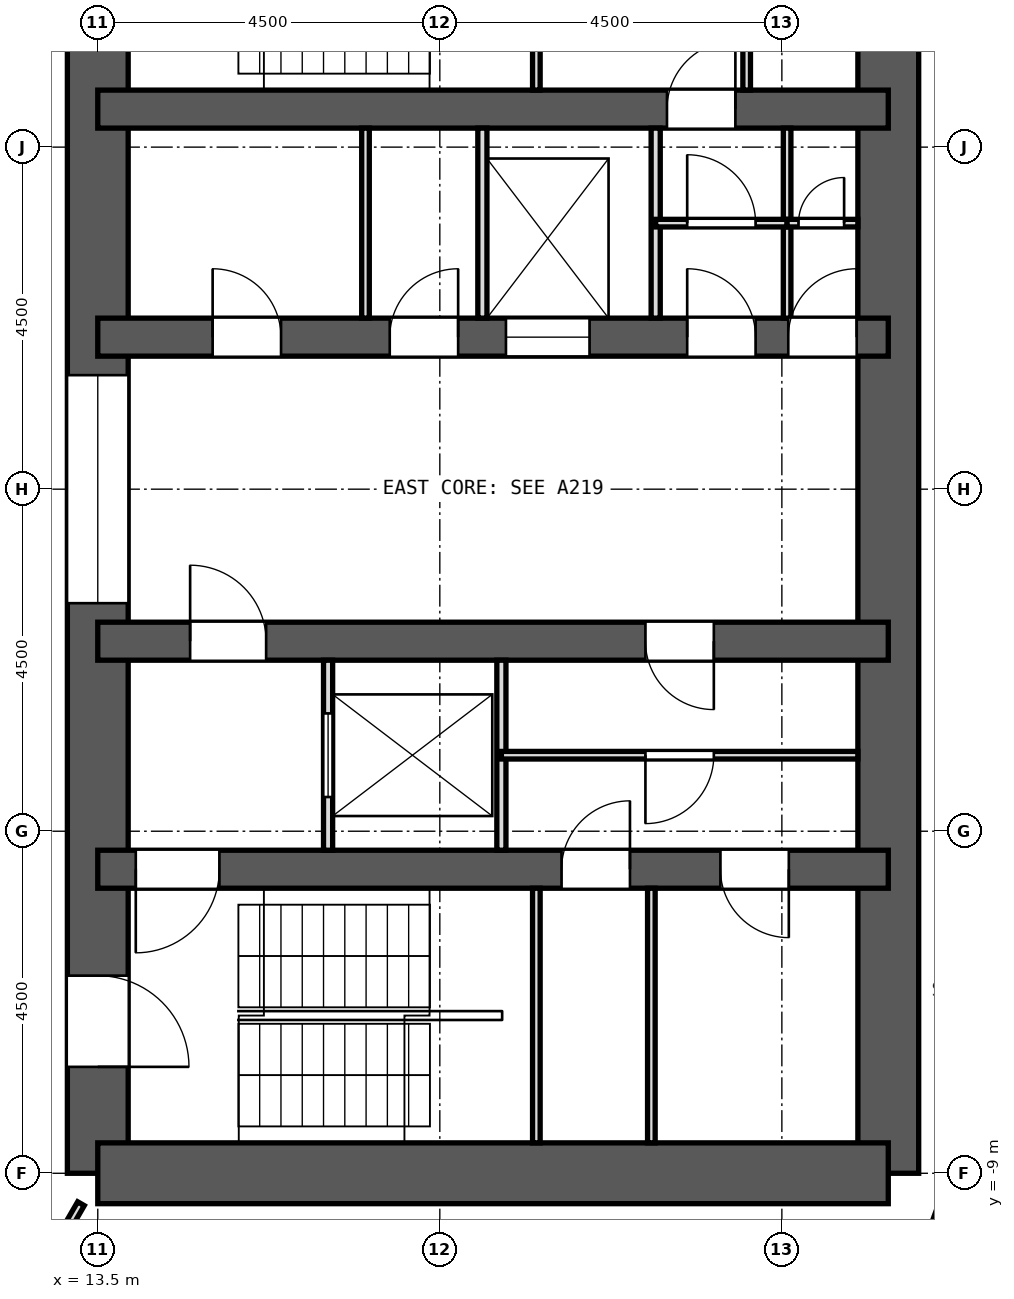
"""IFC4 building model, lengths in metres.
Left out: names, types, materials, properties, quantities, classifications, styles, units other than length and angle.
Written with IfcOpenShell. Run it as: python <this file> out.ifc"""

import sys

from ifc_helpers import new_model, si_unit, direction, frame, frame_2d, origin, place, context, subcontext, project, spatial, rectangle, extrude, element, fill, save


model = new_model("IFC4")
c1 = context("Model", 3, precision=1e-05, world=origin(), true_north=direction((0.0, 1.0)))
c2 = subcontext(c1, "Body", "Model", "MODEL_VIEW")
j1 = project(units=[si_unit("LENGTHUNIT", "METRE"), si_unit("PLANEANGLEUNIT", "RADIAN")], contexts=[c1])
p1 = place(None, origin())
s1 = spatial("IfcSite", under=j1, at=p1, CompositionType="ELEMENT")
p2 = place(p1, origin())
s2 = spatial("IfcBuilding", under=s1, at=p2, CompositionType="ELEMENT")
p3 = place(p2, frame((0.0, 0.0, 111.7)))
s3 = spatial("IfcBuildingStorey", under=s2, at=p3, CompositionType="ELEMENT", Elevation=111.7)
p4 = place(p3, frame((13.5, -9.0, 0.0), z_axis=(0.0, 0.0, 1.0), x_axis=(0.0, 1.0, 0.0)))
e1 = element("IfcWall", 1, at=p4, inside=s3, PredefinedType="SHEAR", context=c2, shape_type="SweptSolid", body=[
    extrude(rectangle(XDim=18.0, YDim=0.8, at=frame_2d((9.0, 0.0))), origin(), (0.0, 0.0, 1.0), 3.3),
])
p5 = place(p4, frame((15.4, 0.0, 0.0)))
e2 = element("IfcOpeningElement", 2, at=p5, cuts=e1, PredefinedType="OPENING", context=c2, shape_type="SweptSolid", body=[
    extrude(rectangle(XDim=1.2, YDim=2.1, at=frame_2d((0.6, 1.05))), frame((0.0, 0.412, 0.0), z_axis=(0.0, -1.0, 0.0), x_axis=(1.0, 0.0, 0.0)), (0.0, 0.0, 1.0), 0.824),
])
p6 = place(p4, frame((1.4, 0.0, 0.0)))
e3 = element("IfcOpeningElement", 3, at=p6, cuts=e1, PredefinedType="OPENING", context=c2, shape_type="SweptSolid", body=[
    extrude(rectangle(XDim=1.2, YDim=2.1, at=frame_2d((0.6, 1.05))), frame((0.0, 0.412, 0.0), z_axis=(0.0, -1.0, 0.0), x_axis=(1.0, 0.0, 0.0)), (0.0, 0.0, 1.0), 0.824),
])
p7 = place(p4, frame((7.5, 0.0, 0.0)))
e4 = element("IfcOpeningElement", 4, at=p7, cuts=e1, PredefinedType="OPENING", context=c2, shape_type="SweptSolid", body=[
    extrude(rectangle(XDim=3.0, YDim=2.4, at=frame_2d((1.5, 1.2))), frame((0.0, 0.412, 0.0), z_axis=(0.0, -1.0, 0.0), x_axis=(1.0, 0.0, 0.0)), (0.0, 0.0, 1.0), 0.824),
])
p8 = place(p3, frame((23.9, -9.0, 0.0), z_axis=(0.0, 0.0, 1.0), x_axis=(0.0, 1.0, 0.0)))
e5 = element("IfcWall", 5, at=p8, inside=s3, PredefinedType="SHEAR", context=c2, shape_type="SweptSolid", body=[
    extrude(rectangle(XDim=18.0, YDim=0.8, at=frame_2d((9.0, 0.0))), origin(), (0.0, 0.0, 1.0), 3.3),
])
p9 = place(p3, frame((13.5, -9.0, 0.0), z_axis=(0.0, 0.0, 1.0), x_axis=(1.0, 0.0, 0.0)))
e6 = element("IfcWall", 6, at=p9, inside=s3, PredefinedType="SHEAR", context=c2, shape_type="SweptSolid", body=[
    extrude(rectangle(XDim=10.4, YDim=0.8, at=frame_2d((5.2, 0.0))), origin(), (0.0, 0.0, 1.0), 3.3),
])
p10 = place(p3, frame((13.5, 5.0, 0.0), z_axis=(0.0, 0.0, 1.0), x_axis=(1.0, 0.0, 0.0)))
e7 = element("IfcWall", 7, at=p10, inside=s3, PredefinedType="SHEAR", context=c2, shape_type="SweptSolid", body=[
    extrude(rectangle(XDim=10.4, YDim=0.5, at=frame_2d((5.2, 0.0))), origin(), (0.0, 0.0, 1.0), 3.3),
])
p11 = place(p10, frame((7.489, 0.0, 0.0)))
e8 = element("IfcOpeningElement", 8, at=p11, cuts=e7, PredefinedType="OPENING", context=c2, shape_type="SweptSolid", body=[
    extrude(rectangle(XDim=0.9, YDim=2.1, at=frame_2d((0.45, 1.05))), frame((0.0, 0.262, 0.0), z_axis=(0.0, -1.0, 0.0), x_axis=(1.0, 0.0, 0.0)), (0.0, 0.0, 1.0), 0.524),
])
p12 = place(p3, frame((13.5, -5.0, 0.0), z_axis=(0.0, 0.0, 1.0), x_axis=(1.0, 0.0, 0.0)))
e9 = element("IfcWall", 9, at=p12, inside=s3, PredefinedType="SHEAR", context=c2, shape_type="SweptSolid", body=[
    extrude(rectangle(XDim=10.4, YDim=0.5, at=frame_2d((5.2, 0.0))), origin(), (0.0, 0.0, 1.0), 3.3),
])
p13 = place(p12, frame((6.102, 0.0, 0.0)))
e10 = element("IfcOpeningElement", 10, at=p13, cuts=e9, PredefinedType="OPENING", context=c2, shape_type="SweptSolid", body=[
    extrude(rectangle(XDim=0.9, YDim=2.1, at=frame_2d((0.45, 1.05))), frame((0.0, 0.262, 0.0), z_axis=(0.0, -1.0, 0.0), x_axis=(1.0, 0.0, 0.0)), (0.0, 0.0, 1.0), 0.524),
])
p14 = place(p12, frame((8.191, 0.0, 0.0)))
e11 = element("IfcOpeningElement", 11, at=p14, cuts=e9, PredefinedType="OPENING", context=c2, shape_type="SweptSolid", body=[
    extrude(rectangle(XDim=0.9, YDim=2.1, at=frame_2d((0.45, 1.05))), frame((0.0, 0.262, 0.0), z_axis=(0.0, -1.0, 0.0), x_axis=(1.0, 0.0, 0.0)), (0.0, 0.0, 1.0), 0.524),
])
p15 = place(p12, frame((0.5, 0.0, 0.0)))
e12 = element("IfcOpeningElement", 12, at=p15, cuts=e9, PredefinedType="OPENING", context=c2, shape_type="SweptSolid", body=[
    extrude(rectangle(XDim=1.1, YDim=2.1, at=frame_2d((0.55, 1.05))), frame((0.0, 0.262, 0.0), z_axis=(0.0, -1.0, 0.0), x_axis=(1.0, 0.0, 0.0)), (0.0, 0.0, 1.0), 0.524),
])
p16 = place(p3, frame((13.5, 2.0, 0.0), z_axis=(0.0, 0.0, 1.0), x_axis=(1.0, 0.0, 0.0)))
e13 = element("IfcWall", 13, at=p16, inside=s3, PredefinedType="SHEAR", context=c2, shape_type="SweptSolid", body=[
    extrude(rectangle(XDim=10.4, YDim=0.5, at=frame_2d((5.2, 0.0))), origin(), (0.0, 0.0, 1.0), 3.3),
])
p17 = place(p16, frame((5.37, 0.0, 0.0)))
e14 = element("IfcOpeningElement", 14, at=p17, cuts=e13, PredefinedType="OPENING", context=c2, shape_type="SweptSolid", body=[
    extrude(rectangle(XDim=1.1, YDim=2.1, at=frame_2d((0.55, 1.05))), frame((0.0, 0.262, 0.0), z_axis=(0.0, -1.0, 0.0), x_axis=(1.0, 0.0, 0.0)), (0.0, 0.0, 1.0), 0.524),
])
p18 = place(p16, frame((1.511, 0.0, 0.0)))
e15 = element("IfcOpeningElement", 15, at=p18, cuts=e13, PredefinedType="OPENING", context=c2, shape_type="SweptSolid", body=[
    extrude(rectangle(XDim=0.9, YDim=2.1, at=frame_2d((0.45, 1.05))), frame((0.0, 0.262, 0.0), z_axis=(0.0, -1.0, 0.0), x_axis=(1.0, 0.0, 0.0)), (0.0, 0.0, 1.0), 0.524),
])
p19 = place(p16, frame((3.841, 0.0, 0.0)))
e16 = element("IfcOpeningElement", 16, at=p19, cuts=e13, PredefinedType="OPENING", context=c2, shape_type="SweptSolid", body=[
    extrude(rectangle(XDim=0.9, YDim=2.1, at=frame_2d((0.45, 1.05))), frame((0.0, 0.262, 0.0), z_axis=(0.0, -1.0, 0.0), x_axis=(1.0, 0.0, 0.0)), (0.0, 0.0, 1.0), 0.524),
])
p20 = place(p16, frame((7.754, 0.0, 0.0)))
e17 = element("IfcOpeningElement", 17, at=p20, cuts=e13, PredefinedType="OPENING", context=c2, shape_type="SweptSolid", body=[
    extrude(rectangle(XDim=0.9, YDim=2.1, at=frame_2d((0.45, 1.05))), frame((0.0, 0.262, 0.0), z_axis=(0.0, -1.0, 0.0), x_axis=(1.0, 0.0, 0.0)), (0.0, 0.0, 1.0), 0.524),
])
p21 = place(p16, frame((9.084, 0.0, 0.0)))
e18 = element("IfcOpeningElement", 18, at=p21, cuts=e13, PredefinedType="OPENING", context=c2, shape_type="SweptSolid", body=[
    extrude(rectangle(XDim=0.9, YDim=2.1, at=frame_2d((0.45, 1.05))), frame((0.0, 0.262, 0.0), z_axis=(0.0, -1.0, 0.0), x_axis=(1.0, 0.0, 0.0)), (0.0, 0.0, 1.0), 0.524),
])
p22 = place(p3, frame((13.5, -2.0, 0.0), z_axis=(0.0, 0.0, 1.0), x_axis=(1.0, 0.0, 0.0)))
e19 = element("IfcWall", 19, at=p22, inside=s3, PredefinedType="SHEAR", context=c2, shape_type="SweptSolid", body=[
    extrude(rectangle(XDim=10.4, YDim=0.5, at=frame_2d((5.2, 0.0))), origin(), (0.0, 0.0, 1.0), 3.3),
])
p23 = place(p22, frame((1.215, 0.0, 0.0)))
e20 = element("IfcOpeningElement", 20, at=p23, cuts=e19, PredefinedType="OPENING", context=c2, shape_type="SweptSolid", body=[
    extrude(rectangle(XDim=1.0, YDim=2.1, at=frame_2d((0.5, 1.05))), frame((0.0, 0.262, 0.0), z_axis=(0.0, -1.0, 0.0), x_axis=(1.0, 0.0, 0.0)), (0.0, 0.0, 1.0), 0.524),
])
p24 = place(p22, frame((7.205, 0.0, 0.0)))
e21 = element("IfcOpeningElement", 21, at=p24, cuts=e19, PredefinedType="OPENING", context=c2, shape_type="SweptSolid", body=[
    extrude(rectangle(XDim=0.9, YDim=2.1, at=frame_2d((0.45, 1.05))), frame((0.0, 0.262, 0.0), z_axis=(0.0, -1.0, 0.0), x_axis=(1.0, 0.0, 0.0)), (0.0, 0.0, 1.0), 0.524),
])
p25 = place(p3, frame((24.369, -10.811, 0.0), z_axis=(0.0, 0.0, 1.0), x_axis=(0.341990236633, 0.939703505393, 0.0)))
e22 = element("IfcWall", 22, at=p25, inside=s3, PredefinedType="SOLIDWALL", context=c2, shape_type="SweptSolid", body=[
    extrude(rectangle(XDim=3.648, YDim=0.6, at=frame_2d((1.824, 0.0))), origin(), (0.0, 0.0, 1.0), 2.8),
])
p26 = place(p3, frame((13.071, -9.76, 0.0), z_axis=(0.0, 0.0, 1.0), x_axis=(0.500179786662, 0.865921579021, 0.0)))
e23 = element("IfcWall", 23, at=p26, inside=s3, PredefinedType="PARTITIONING", context=c2, shape_type="SweptSolid", body=[
    extrude(rectangle(XDim=0.416, YDim=0.1, at=frame_2d((0.208, 0.0))), origin(), (0.0, 0.0, 1.0), 2.8),
])
p27 = place(p3, frame((17.022, 2.25, 0.0), z_axis=(0.0, 0.0, 1.0), x_axis=(0.0, 1.0, 0.0)))
e24 = element("IfcWall", 24, at=p27, inside=s3, PredefinedType="PARTITIONING", context=c2, shape_type="SweptSolid", body=[
    extrude(rectangle(XDim=2.5, YDim=0.1, at=frame_2d((1.25, 0.0))), origin(), (0.0, 0.0, 1.0), 2.8),
])
for number, where, z_axis, x_axis in (
    (25, (18.56, 2.25, 0.0), (0.0, 0.0, 1.0), (0.0, 1.0, 0.0)),
    (26, (20.84, 2.25, 0.0), (0.0, 0.0, 1.0), (0.0, 1.0, 0.0)),
):
    element("IfcWall", number, at=place(p3, frame(where, z_axis=z_axis, x_axis=x_axis)), inside=s3, PredefinedType="PARTITIONING", context=c2, shape_type="SweptSolid", body=[
        extrude(rectangle(XDim=2.5, YDim=0.12, at=frame_2d((1.25, 0.0))), origin(), (0.0, 0.0, 1.0), 2.8),
    ])
p28 = place(p3, frame((22.569, 2.25, 0.0), z_axis=(0.0, 0.0, 1.0), x_axis=(0.0, 1.0, 0.0)))
e27 = element("IfcWall", 27, at=p28, inside=s3, PredefinedType="PARTITIONING", context=c2, shape_type="SweptSolid", body=[
    extrude(rectangle(XDim=2.5, YDim=0.1, at=frame_2d((1.25, 0.0))), origin(), (0.0, 0.0, 1.0), 2.8),
])
p29 = place(p3, frame((16.53, -4.75, 0.0), z_axis=(0.0, 0.0, 1.0), x_axis=(0.0, 1.0, 0.0)))
e28 = element("IfcWall", 28, at=p29, inside=s3, PredefinedType="PARTITIONING", context=c2, shape_type="SweptSolid", body=[
    extrude(rectangle(XDim=2.5, YDim=0.12, at=frame_2d((1.25, 0.0))), origin(), (0.0, 0.0, 1.0), 2.8),
])
p30 = place(p29, frame((0.7, 0.0, 0.0)))
e29 = element("IfcOpeningElement", 29, at=p30, cuts=e28, PredefinedType="OPENING", context=c2, shape_type="SweptSolid", body=[
    extrude(rectangle(XDim=1.1, YDim=2.1, at=frame_2d((0.55, 1.05))), frame((0.0, 0.072, 0.0), z_axis=(0.0, -1.0, 0.0), x_axis=(1.0, 0.0, 0.0)), (0.0, 0.0, 1.0), 0.144),
])
p31 = place(p3, frame((18.81, -4.75, 0.0), z_axis=(0.0, 0.0, 1.0), x_axis=(0.0, 1.0, 0.0)))
e30 = element("IfcWall", 30, at=p31, inside=s3, PredefinedType="PARTITIONING", context=c2, shape_type="SweptSolid", body=[
    extrude(rectangle(XDim=2.5, YDim=0.12, at=frame_2d((1.25, 0.0))), origin(), (0.0, 0.0, 1.0), 2.8),
])
p32 = place(p3, frame((20.84, 3.5, 0.0), z_axis=(0.0, 0.0, 1.0), x_axis=(1.0, 0.0, 0.0)))
e31 = element("IfcWall", 31, at=p32, inside=s3, PredefinedType="PARTITIONING", context=c2, shape_type="SweptSolid", body=[
    extrude(rectangle(XDim=1.729, YDim=0.1, at=frame_2d((0.865, 0.0))), origin(), (0.0, 0.0, 1.0), 2.8),
])
p33 = place(p32, frame((0.415, 0.0, 0.0)))
e32 = element("IfcOpeningElement", 32, at=p33, cuts=e31, PredefinedType="OPENING", context=c2, shape_type="SweptSolid", body=[
    extrude(rectangle(XDim=0.9, YDim=2.1, at=frame_2d((0.45, 1.05))), frame((0.0, 0.062, 0.0), z_axis=(0.0, -1.0, 0.0), x_axis=(1.0, 0.0, 0.0)), (0.0, 0.0, 1.0), 0.124),
])
p34 = place(p3, frame((22.569, 3.5, 0.0), z_axis=(0.0, 0.0, 1.0), x_axis=(1.0, 0.0, 0.0)))
e33 = element("IfcWall", 33, at=p34, inside=s3, PredefinedType="PARTITIONING", context=c2, shape_type="SweptSolid", body=[
    extrude(rectangle(XDim=0.931, YDim=0.1, at=frame_2d((0.465, 0.0))), origin(), (0.0, 0.0, 1.0), 2.8),
])
p35 = place(p34, frame((0.15, 0.0, 0.0)))
e34 = element("IfcOpeningElement", 34, at=p35, cuts=e33, PredefinedType="OPENING", context=c2, shape_type="SweptSolid", body=[
    extrude(rectangle(XDim=0.6, YDim=2.1, at=frame_2d((0.3, 1.05))), frame((0.0, 0.062, 0.0), z_axis=(0.0, -1.0, 0.0), x_axis=(1.0, 0.0, 0.0)), (0.0, 0.0, 1.0), 0.124),
])
p36 = place(p3, frame((18.81, -3.5, 0.0), z_axis=(0.0, 0.0, 1.0), x_axis=(1.0, 0.0, 0.0)))
e35 = element("IfcWall", 35, at=p36, inside=s3, PredefinedType="PARTITIONING", context=c2, shape_type="SweptSolid", body=[
    extrude(rectangle(XDim=4.69, YDim=0.1, at=frame_2d((2.345, 0.0))), origin(), (0.0, 0.0, 1.0), 2.8),
])
p37 = place(p36, frame((1.895, 0.0, 0.0)))
e36 = element("IfcOpeningElement", 36, at=p37, cuts=e35, PredefinedType="OPENING", context=c2, shape_type="SweptSolid", body=[
    extrude(rectangle(XDim=0.9, YDim=2.1, at=frame_2d((0.45, 1.05))), frame((0.0, 0.062, 0.0), z_axis=(0.0, -1.0, 0.0), x_axis=(1.0, 0.0, 0.0)), (0.0, 0.0, 1.0), 0.124),
])
p38 = place(p3, frame((19.27, 5.25, 0.0), z_axis=(0.0, 0.0, 1.0), x_axis=(0.0, 1.0, 0.0)))
e37 = element("IfcWall", 37, at=p38, inside=s3, PredefinedType="PARTITIONING", context=c2, shape_type="SweptSolid", body=[
    extrude(rectangle(XDim=3.35, YDim=0.1, at=frame_2d((1.675, 0.0))), origin(), (0.0, 0.0, 1.0), 2.8),
])
p39 = place(p3, frame((22.037, 5.25, 0.0), z_axis=(0.0, 0.0, 1.0), x_axis=(0.0, 1.0, 0.0)))
e38 = element("IfcWall", 38, at=p39, inside=s3, PredefinedType="PARTITIONING", context=c2, shape_type="SweptSolid", body=[
    extrude(rectangle(XDim=3.35, YDim=0.1, at=frame_2d((1.675, 0.0))), origin(), (0.0, 0.0, 1.0), 2.8),
])
p40 = place(p39, frame((1.225, 0.0, 0.0)))
e39 = element("IfcOpeningElement", 39, at=p40, cuts=e38, PredefinedType="OPENING", context=c2, shape_type="SweptSolid", body=[
    extrude(rectangle(XDim=0.9, YDim=2.1, at=frame_2d((0.45, 1.05))), frame((0.0, 0.062, 0.0), z_axis=(0.0, -1.0, 0.0), x_axis=(1.0, 0.0, 0.0)), (0.0, 0.0, 1.0), 0.124),
])
for number, where, z_axis, x_axis in (
    (40, (19.27, -8.6, 0.0), (0.0, 0.0, 1.0), (0.0, 1.0, 0.0)),
    (41, (20.783, -8.6, 0.0), (0.0, 0.0, 1.0), (0.0, 1.0, 0.0)),
):
    element("IfcWall", number, at=place(p3, frame(where, z_axis=z_axis, x_axis=x_axis)), inside=s3, PredefinedType="PARTITIONING", context=c2, shape_type="SweptSolid", body=[
        extrude(rectangle(XDim=3.35, YDim=0.1, at=frame_2d((1.675, 0.0))), origin(), (0.0, 0.0, 1.0), 2.8),
    ])
p41 = place(p17, origin())
e42 = element("IfcDoor", 42, at=p41, inside=s3, OperationType="DOUBLE_DOOR_SLIDING", PredefinedType="DOOR", context=c2, shape_type="SweptSolid", body=[
    extrude(rectangle(XDim=1.1, YDim=2.1, at=frame_2d((0.55, 1.05))), frame((0.0, 0.025, 0.0), z_axis=(0.0, -1.0, 0.0), x_axis=(1.0, 0.0, 0.0)), (0.0, 0.0, 1.0), 0.05),
])
fill(e14, e42)
p42 = place(p30, origin())
e43 = element("IfcDoor", 43, at=p42, inside=s3, OperationType="DOUBLE_DOOR_SLIDING", PredefinedType="DOOR", context=c2, shape_type="SweptSolid", body=[
    extrude(rectangle(XDim=1.1, YDim=2.1, at=frame_2d((0.55, 1.05))), frame((0.0, 0.025, 0.0), z_axis=(0.0, -1.0, 0.0), x_axis=(1.0, 0.0, 0.0)), (0.0, 0.0, 1.0), 0.05),
])
fill(e29, e43)
p43 = place(p18, origin())
e44 = element("IfcDoor", 44, at=p43, inside=s3, OperationType="SINGLE_SWING_LEFT", PredefinedType="DOOR", context=c2, shape_type="SweptSolid", body=[
    extrude(rectangle(XDim=0.9, YDim=2.1, at=frame_2d((0.45, 1.05))), frame((0.0, 0.025, 0.0), z_axis=(0.0, -1.0, 0.0), x_axis=(1.0, 0.0, 0.0)), (0.0, 0.0, 1.0), 0.05),
])
fill(e15, e44)
p44 = place(p19, origin())
e45 = element("IfcDoor", 45, at=p44, inside=s3, OperationType="SINGLE_SWING_RIGHT", PredefinedType="DOOR", context=c2, shape_type="SweptSolid", body=[
    extrude(rectangle(XDim=0.9, YDim=2.1, at=frame_2d((0.45, 1.05))), frame((0.0, 0.025, 0.0), z_axis=(0.0, -1.0, 0.0), x_axis=(1.0, 0.0, 0.0)), (0.0, 0.0, 1.0), 0.05),
])
fill(e16, e45)
p45 = place(p20, origin())
e46 = element("IfcDoor", 46, at=p45, inside=s3, OperationType="SINGLE_SWING_LEFT", PredefinedType="DOOR", context=c2, shape_type="SweptSolid", body=[
    extrude(rectangle(XDim=0.9, YDim=2.1, at=frame_2d((0.45, 1.05))), frame((0.0, 0.025, 0.0), z_axis=(0.0, -1.0, 0.0), x_axis=(1.0, 0.0, 0.0)), (0.0, 0.0, 1.0), 0.05),
])
fill(e17, e46)
p46 = place(p21, origin())
e47 = element("IfcDoor", 47, at=p46, inside=s3, OperationType="SINGLE_SWING_RIGHT", PredefinedType="DOOR", context=c2, shape_type="SweptSolid", body=[
    extrude(rectangle(XDim=0.9, YDim=2.1, at=frame_2d((0.45, 1.05))), frame((0.0, 0.025, 0.0), z_axis=(0.0, -1.0, 0.0), x_axis=(1.0, 0.0, 0.0)), (0.0, 0.0, 1.0), 0.05),
])
fill(e18, e47)
p47 = place(p23, origin())
e48 = element("IfcDoor", 48, at=p47, inside=s3, OperationType="SINGLE_SWING_LEFT", PredefinedType="DOOR", context=c2, shape_type="SweptSolid", body=[
    extrude(rectangle(XDim=1.0, YDim=2.1, at=frame_2d((0.5, 1.05))), frame((0.0, 0.025, 0.0), z_axis=(0.0, -1.0, 0.0), x_axis=(1.0, 0.0, 0.0)), (0.0, 0.0, 1.0), 0.05),
])
fill(e20, e48)
p48 = place(p24, frame((0.9, 0.0, 0.0), z_axis=(0.0, 0.0, 1.0), x_axis=(-1.0, 0.0, 0.0)))
e49 = element("IfcDoor", 49, at=p48, inside=s3, OperationType="SINGLE_SWING_LEFT", PredefinedType="DOOR", context=c2, shape_type="SweptSolid", body=[
    extrude(rectangle(XDim=0.9, YDim=2.1, at=frame_2d((0.45, 1.05))), frame((0.0, 0.025, 0.0), z_axis=(0.0, -1.0, 0.0), x_axis=(1.0, 0.0, 0.0)), (0.0, 0.0, 1.0), 0.05),
])
fill(e21, e49)
p49 = place(p35, origin())
e50 = element("IfcDoor", 50, at=p49, inside=s3, OperationType="SINGLE_SWING_RIGHT", PredefinedType="DOOR", context=c2, shape_type="SweptSolid", body=[
    extrude(rectangle(XDim=0.6, YDim=2.1, at=frame_2d((0.3, 1.05))), frame((0.0, 0.025, 0.0), z_axis=(0.0, -1.0, 0.0), x_axis=(1.0, 0.0, 0.0)), (0.0, 0.0, 1.0), 0.05),
])
fill(e34, e50)
p50 = place(p33, origin())
e51 = element("IfcDoor", 51, at=p50, inside=s3, OperationType="SINGLE_SWING_LEFT", PredefinedType="DOOR", context=c2, shape_type="SweptSolid", body=[
    extrude(rectangle(XDim=0.9, YDim=2.1, at=frame_2d((0.45, 1.05))), frame((0.0, 0.025, 0.0), z_axis=(0.0, -1.0, 0.0), x_axis=(1.0, 0.0, 0.0)), (0.0, 0.0, 1.0), 0.05),
])
fill(e32, e51)
p51 = place(p11, origin())
e52 = element("IfcDoor", 52, at=p51, inside=s3, OperationType="SINGLE_SWING_RIGHT", PredefinedType="DOOR", context=c2, shape_type="SweptSolid", body=[
    extrude(rectangle(XDim=0.9, YDim=2.1, at=frame_2d((0.45, 1.05))), frame((0.0, 0.025, 0.0), z_axis=(0.0, -1.0, 0.0), x_axis=(1.0, 0.0, 0.0)), (0.0, 0.0, 1.0), 0.05),
])
fill(e8, e52)
p52 = place(p37, frame((0.9, 0.0, 0.0), z_axis=(0.0, 0.0, 1.0), x_axis=(-1.0, 0.0, 0.0)))
e53 = element("IfcDoor", 53, at=p52, inside=s3, OperationType="SINGLE_SWING_RIGHT", PredefinedType="DOOR", context=c2, shape_type="SweptSolid", body=[
    extrude(rectangle(XDim=0.9, YDim=2.1, at=frame_2d((0.45, 1.05))), frame((0.0, 0.025, 0.0), z_axis=(0.0, -1.0, 0.0), x_axis=(1.0, 0.0, 0.0)), (0.0, 0.0, 1.0), 0.05),
])
fill(e36, e53)
p53 = place(p13, origin())
e54 = element("IfcDoor", 54, at=p53, inside=s3, OperationType="SINGLE_SWING_RIGHT", PredefinedType="DOOR", context=c2, shape_type="SweptSolid", body=[
    extrude(rectangle(XDim=0.9, YDim=2.1, at=frame_2d((0.45, 1.05))), frame((0.0, 0.025, 0.0), z_axis=(0.0, -1.0, 0.0), x_axis=(1.0, 0.0, 0.0)), (0.0, 0.0, 1.0), 0.05),
])
fill(e10, e54)
p54 = place(p14, frame((0.9, 0.0, 0.0), z_axis=(0.0, 0.0, 1.0), x_axis=(-1.0, 0.0, 0.0)))
e55 = element("IfcDoor", 55, at=p54, inside=s3, OperationType="SINGLE_SWING_LEFT", PredefinedType="DOOR", context=c2, shape_type="SweptSolid", body=[
    extrude(rectangle(XDim=0.9, YDim=2.1, at=frame_2d((0.45, 1.05))), frame((0.0, 0.025, 0.0), z_axis=(0.0, -1.0, 0.0), x_axis=(1.0, 0.0, 0.0)), (0.0, 0.0, 1.0), 0.05),
])
fill(e11, e55)
p55 = place(p15, frame((1.1, 0.0, 0.0), z_axis=(0.0, 0.0, 1.0), x_axis=(-1.0, 0.0, 0.0)))
e56 = element("IfcDoor", 56, at=p55, inside=s3, OperationType="SINGLE_SWING_RIGHT", PredefinedType="DOOR", context=c2, shape_type="SweptSolid", body=[
    extrude(rectangle(XDim=1.1, YDim=2.1, at=frame_2d((0.55, 1.05))), frame((0.0, 0.025, 0.0), z_axis=(0.0, -1.0, 0.0), x_axis=(1.0, 0.0, 0.0)), (0.0, 0.0, 1.0), 0.05),
])
fill(e12, e56)
p56 = place(p6, frame((1.2, 0.0, 0.0), z_axis=(0.0, 0.0, 1.0), x_axis=(-1.0, 0.0, 0.0)))
e57 = element("IfcDoor", 57, at=p56, inside=s3, OperationType="SINGLE_SWING_RIGHT", PredefinedType="DOOR", context=c2, shape_type="SweptSolid", body=[
    extrude(rectangle(XDim=1.2, YDim=2.1, at=frame_2d((0.6, 1.05))), frame((0.0, 0.025, 0.0), z_axis=(0.0, -1.0, 0.0), x_axis=(1.0, 0.0, 0.0)), (0.0, 0.0, 1.0), 0.05),
])
fill(e3, e57)
p57 = place(p7, origin())
e58 = element("IfcDoor", 58, at=p57, inside=s3, OperationType="DOUBLE_DOOR_SLIDING", PredefinedType="DOOR", context=c2, shape_type="SweptSolid", body=[
    extrude(rectangle(XDim=3.0, YDim=2.4, at=frame_2d((1.5, 1.2))), frame((0.0, 0.025, 0.0), z_axis=(0.0, -1.0, 0.0), x_axis=(1.0, 0.0, 0.0)), (0.0, 0.0, 1.0), 0.05),
])
fill(e4, e58)
save(model, sys.argv[1])
